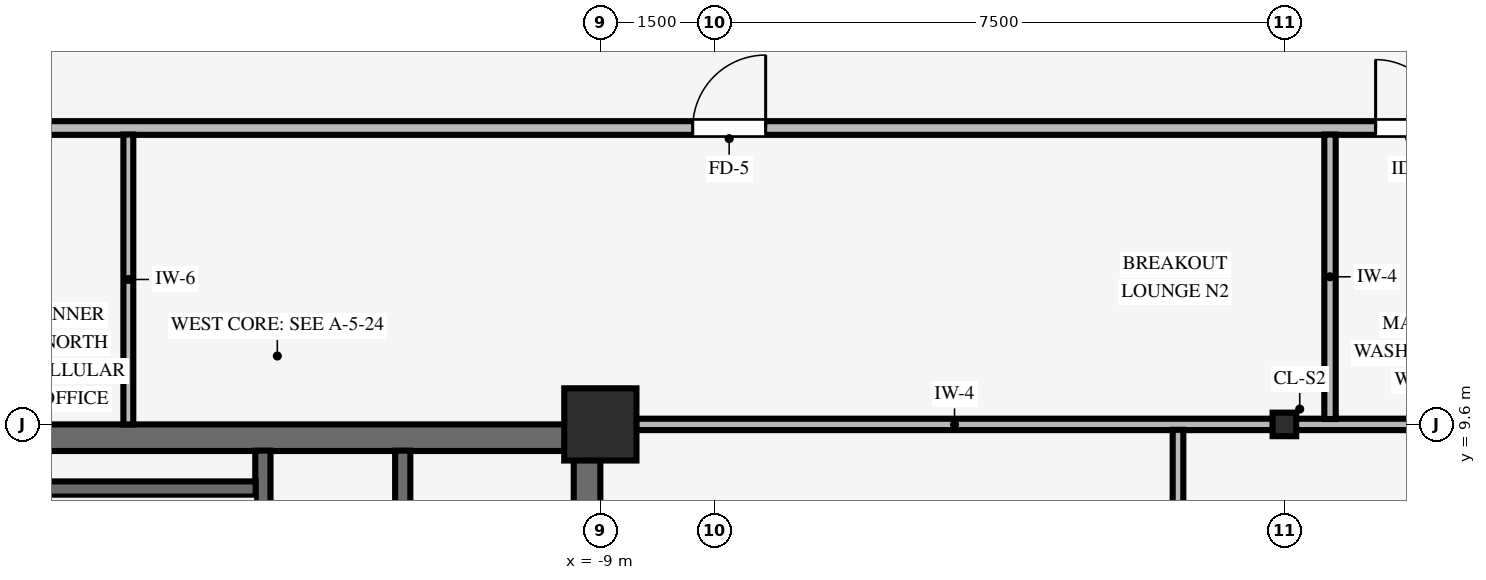
"""IFC4 building model, lengths in metres.
Left out: names, types, materials, properties, quantities, classifications, styles, units other than length and angle.
Written with IfcOpenShell. Run it as: python <this file> out.ifc"""

import sys

from ifc_helpers import new_model, si_unit, direction, frame, frame_2d, origin, origin_2d, place, context, subcontext, project, spatial, rectangle, i_section, extrude, source, transform, mapped, element, fill, save


model = new_model("IFC4")
c1 = context("Model", 3, precision=1e-05, world=origin(), true_north=direction((0.0, 1.0)))
c2 = subcontext(c1, "Body", "Model", "MODEL_VIEW")
j1 = project(units=[si_unit("LENGTHUNIT", "METRE"), si_unit("PLANEANGLEUNIT", "RADIAN")], contexts=[c1])
p1 = place(None, origin())
s1 = spatial("IfcSite", under=j1, at=p1, CompositionType="ELEMENT")
p2 = place(p1, origin())
s2 = spatial("IfcBuilding", under=s1, at=p2, CompositionType="ELEMENT")
p3 = place(p2, frame((0.0, 0.0, 209.15)))
s3 = spatial("IfcBuildingStorey", under=s2, at=p3, CompositionType="ELEMENT", Elevation=209.15)
p4 = place(p3, frame((-17.5, 9.425, 0.0), z_axis=(0.0, 0.0, 1.0), x_axis=(1.0, 0.0, 0.0)))
e1 = element("IfcWall", 1, at=p4, inside=s3, PredefinedType="SHEAR", context=c2, shape_type="SweptSolid", body=[
    extrude(rectangle(XDim=8.5, YDim=0.35, at=frame_2d((4.25, 0.0))), origin(), (0.0, 0.0, 1.0), 3.37),
])
p5 = place(p3, frame((-9.175, -9.255, 0.0), z_axis=(0.0, 0.0, 1.0), x_axis=(0.0, 1.0, 0.0)))
e2 = element("IfcWall", 2, at=p5, inside=s3, PredefinedType="SHEAR", context=c2, shape_type="SweptSolid", body=[
    extrude(rectangle(XDim=18.51, YDim=0.35, at=frame_2d((9.255, 0.0))), origin(), (0.0, 0.0, 1.0), 3.37),
])
p6 = place(p5, frame((8.655, 0.0, 0.0)))
e3 = element("IfcOpeningElement", 3, at=p6, cuts=e2, PredefinedType="OPENING", context=c2, shape_type="SweptSolid", body=[
    extrude(rectangle(XDim=1.2, YDim=2.15, at=frame_2d((0.6, 1.075))), frame((0.0, 0.185, 0.0), z_axis=(0.0, -1.0, 0.0), x_axis=(1.0, 0.0, 0.0)), (0.0, 0.0, 1.0), 0.37),
])
p7 = place(p3, frame((-9.0, 9.6, 0.0), z_axis=(0.0, 0.0, 1.0), x_axis=(1.0, 0.0, 0.0)))
e4 = element("IfcColumn", 4, at=p7, inside=s3, PredefinedType="COLUMN", context=c2, shape_type="SweptSolid", body=[
    extrude(rectangle(XDim=0.95, YDim=0.95, at=origin_2d()), origin(), (0.0, 0.0, 1.0), 3.37),
])
p8 = place(p3, frame((0.0, 9.6, 0.0), z_axis=(0.0, 0.0, 1.0), x_axis=(1.0, 0.0, 0.0)))
e5 = element("IfcColumn", 5, at=p8, inside=s3, PredefinedType="COLUMN", context=c2, shape_type="SweptSolid", body=[
    extrude(i_section(OverallWidth=0.31, OverallDepth=0.31, WebThickness=0.015, FlangeThickness=0.015, FilletRadius=0.015, at=origin_2d()), origin(), (0.0, 0.0, 1.0), 3.37),
])
p9 = place(p3, frame((-13.44, 0.9, 0.0), z_axis=(0.0, 0.0, 1.0), x_axis=(0.0, 1.0, 0.0)))
e6 = element("IfcWall", 6, at=p9, inside=s3, PredefinedType="SHEAR", context=c2, shape_type="SweptSolid", body=[
    extrude(rectangle(XDim=8.355, YDim=0.2, at=frame_2d((4.177, 0.0))), origin(), (0.0, 0.0, 1.0), 3.37),
])
p10 = place(p9, frame((1.53, 0.0, 0.0), z_axis=(0.0, 0.0, 1.0), x_axis=(-1.0, 0.0, 0.0)))
e7 = element("IfcOpeningElement", 7, at=p10, cuts=e6, PredefinedType="OPENING", context=c2, shape_type="SweptSolid", body=[
    extrude(rectangle(XDim=1.1, YDim=2.15, at=frame_2d((0.55, 1.075))), frame((0.0, 0.11, 0.0), z_axis=(0.0, -1.0, 0.0), x_axis=(1.0, 0.0, 0.0)), (0.0, 0.0, 1.0), 0.22),
])
p11 = place(p3, frame((-17.155, 8.75, 0.0), z_axis=(0.0, 0.0, 1.0), x_axis=(1.0, 0.0, 0.0)))
e8 = element("IfcWall", 8, at=p11, inside=s3, PredefinedType="SHEAR", context=c2, shape_type="SweptSolid", body=[
    extrude(rectangle(XDim=3.62, YDim=0.2, at=frame_2d((1.81, 0.0))), origin(), (0.0, 0.0, 1.0), 3.37),
])
p12 = place(p3, frame((-11.6, 1.3, 0.0), z_axis=(0.0, 0.0, 1.0), x_axis=(0.0, 1.0, 0.0)))
e9 = element("IfcWall", 9, at=p12, inside=s3, PredefinedType="SHEAR", context=c2, shape_type="SweptSolid", body=[
    extrude(rectangle(XDim=7.955, YDim=0.2, at=frame_2d((3.978, 0.0))), origin(), (0.0, 0.0, 1.0), 3.37),
])
p13 = place(p3, frame((-8.529, 9.6, 0.0), z_axis=(0.0, 0.0, 1.0), x_axis=(1.0, 0.0, 0.0)))
e10 = element("IfcWall", 10, at=p13, inside=s3, PredefinedType="PARTITIONING", context=c2, shape_type="SweptSolid", body=[
    extrude(rectangle(XDim=8.378, YDim=0.15, at=frame_2d((4.189, 0.0))), origin(), (0.0, 0.0, 1.0), 2.405),
])
p14 = place(p3, frame((0.151, 9.6, 0.0), z_axis=(0.0, 0.0, 1.0), x_axis=(1.0, 0.0, 0.0)))
e11 = element("IfcWall", 11, at=p14, inside=s3, PredefinedType="PARTITIONING", context=c2, shape_type="SweptSolid", body=[
    extrude(rectangle(XDim=6.363, YDim=0.15, at=frame_2d((3.182, 0.0))), origin(), (0.0, 0.0, 1.0), 2.405),
])
p15 = place(p3, frame((-17.7, 13.5, 0.0), z_axis=(0.0, 0.0, 1.0), x_axis=(1.0, 0.0, 0.0)))
e12 = element("IfcWall", 12, at=p15, inside=s3, PredefinedType="PARTITIONING", context=c2, shape_type="SweptSolid", body=[
    extrude(rectangle(XDim=24.3, YDim=0.18, at=frame_2d((12.15, 0.0))), origin(), (0.0, 0.0, 1.0), 3.008),
])
p16 = place(p15, frame((9.915, 0.0, 0.0)))
e13 = element("IfcOpeningElement", 13, at=p16, cuts=e12, PredefinedType="OPENING", context=c2, shape_type="SweptSolid", body=[
    extrude(rectangle(XDim=0.96, YDim=2.1, at=frame_2d((0.48, 1.05))), frame((0.0, 0.1, 0.0), z_axis=(0.0, -1.0, 0.0), x_axis=(1.0, 0.0, 0.0)), (0.0, 0.0, 1.0), 0.2),
])
p17 = place(p15, frame((18.9, 0.0, 0.0)))
e14 = element("IfcOpeningElement", 14, at=p17, cuts=e12, PredefinedType="OPENING", context=c2, shape_type="SweptSolid", body=[
    extrude(rectangle(XDim=0.9, YDim=2.1, at=frame_2d((0.45, 1.05))), frame((0.0, 0.1, 0.0), z_axis=(0.0, -1.0, 0.0), x_axis=(1.0, 0.0, 0.0)), (0.0, 0.0, 1.0), 0.2),
])
p18 = place(p15, frame((21.0, 0.0, 0.0)))
e15 = element("IfcOpeningElement", 15, at=p18, cuts=e12, PredefinedType="OPENING", context=c2, shape_type="SweptSolid", body=[
    extrude(rectangle(XDim=0.9, YDim=2.1, at=frame_2d((0.45, 1.05))), frame((0.0, 0.1, 0.0), z_axis=(0.0, -1.0, 0.0), x_axis=(1.0, 0.0, 0.0)), (0.0, 0.0, 1.0), 0.2),
])
p19 = place(p3, frame((-15.21, 9.6, 0.0), z_axis=(0.0, 0.0, 1.0), x_axis=(0.0, 1.0, 0.0)))
e16 = element("IfcWall", 16, at=p19, inside=s3, PredefinedType="PARTITIONING", context=c2, shape_type="SweptSolid", body=[
    extrude(rectangle(XDim=3.814, YDim=0.13, at=frame_2d((1.907, 0.0))), origin(), (0.0, 0.0, 1.0), 3.36),
])
p20 = place(p3, frame((-1.4, 1.336, 0.0), z_axis=(0.0, 0.0, 1.0), x_axis=(0.0, 1.0, 0.0)))
e17 = element("IfcWall", 17, at=p20, inside=s3, PredefinedType="PARTITIONING", context=c2, shape_type="SweptSolid", body=[
    extrude(rectangle(XDim=8.193, YDim=0.14, at=frame_2d((4.097, 0.0))), origin(), (0.0, 0.0, 1.0), 3.36),
])
p21 = place(p3, frame((0.6, 9.671, 0.0), z_axis=(0.0, 0.0, 1.0), x_axis=(0.0, 1.0, 0.0)))
e18 = element("IfcWall", 18, at=p21, inside=s3, PredefinedType="PARTITIONING", context=c2, shape_type="SweptSolid", body=[
    extrude(rectangle(XDim=3.743, YDim=0.15, at=frame_2d((1.872, 0.0))), origin(), (0.0, 0.0, 1.0), 3.36),
])
m1 = source(origin(), c2, "Body", "SweptSolid", [
    extrude(rectangle(XDim=0.96, YDim=2.1, at=frame_2d((0.48, 1.05))), frame((0.0, 0.025, 0.0), z_axis=(0.0, -1.0, 0.0), x_axis=(1.0, 0.0, 0.0)), (0.0, 0.0, 1.0), 0.05),
])
p22 = place(p16, origin())
e19 = element("IfcDoor", 19, at=p22, inside=s3, OperationType="SINGLE_SWING_RIGHT", PredefinedType="DOOR", context=c2, shape_type="MappedRepresentation", body=[
    mapped(m1, transform((0.0, 0.0, 0.0), scale=1.0)),
])
fill(e13, e19)
m2 = source(origin(), c2, "Body", "SweptSolid", [
    extrude(rectangle(XDim=0.9, YDim=2.1, at=frame_2d((0.45, 1.05))), frame((0.0, 0.025, 0.0), z_axis=(0.0, -1.0, 0.0), x_axis=(1.0, 0.0, 0.0)), (0.0, 0.0, 1.0), 0.05),
])
p23 = place(p17, origin())
e20 = element("IfcDoor", 20, at=p23, inside=s3, OperationType="SINGLE_SWING_LEFT", PredefinedType="DOOR", context=c2, shape_type="MappedRepresentation", body=[
    mapped(m2, transform((0.0, 0.0, 0.0), scale=1.0)),
])
fill(e14, e20)
save(model, sys.argv[1])
